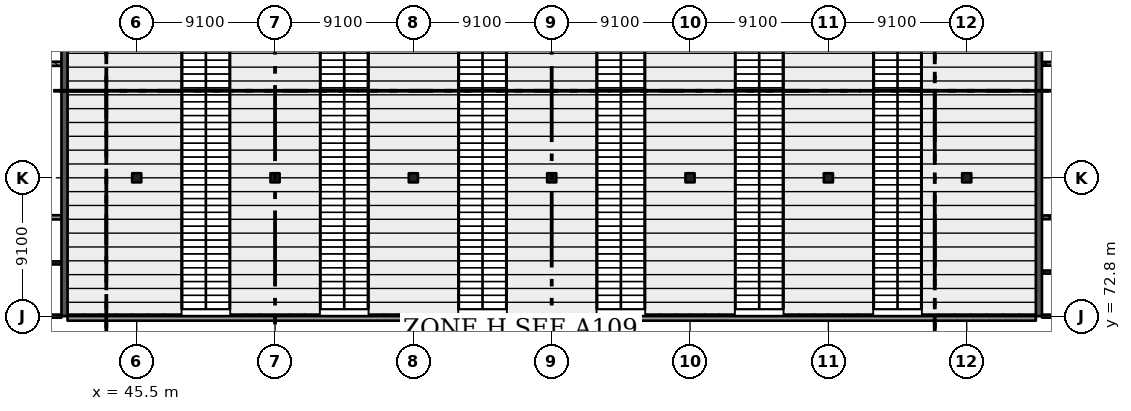
"""IFC4 building model, lengths in metres.
Left out: names, types, materials, properties, quantities, classifications, styles, units other than length and angle.
Written with IfcOpenShell. Run it as: python <this file> out.ifc"""

import sys

from ifc_helpers import new_model, si_unit, direction, frame, frame_2d, origin, origin_2d, place, context, subcontext, project, spatial, rectangle, extrude, element, save


model = new_model("IFC4")
c1 = context("Model", 3, precision=1e-05, world=origin(), true_north=direction((0.0, 1.0)))
c2 = subcontext(c1, "Body", "Model", "MODEL_VIEW")
j1 = project(units=[si_unit("LENGTHUNIT", "METRE"), si_unit("PLANEANGLEUNIT", "RADIAN")], contexts=[c1])
p1 = place(None, origin())
s1 = spatial("IfcSite", under=j1, at=p1, CompositionType="ELEMENT")
p2 = place(p1, origin())
s2 = spatial("IfcBuilding", under=s1, at=p2, CompositionType="ELEMENT")
p3 = place(p2, origin())
s3 = spatial("IfcBuildingStorey", under=s2, at=p3, CompositionType="ELEMENT", Elevation=0.0)
for number, where, z_axis, x_axis in (
    (1, (45.5, 81.9, -0.4), (0.0, 0.0, 1.0), (1.0, 0.0, 0.0)),
    (2, (54.6, 81.9, -0.4), (0.0, 0.0, 1.0), (1.0, 0.0, 0.0)),
    (3, (63.7, 81.9, -0.4), (0.0, 0.0, 1.0), (1.0, 0.0, 0.0)),
    (4, (72.8, 81.9, -0.4), (0.0, 0.0, 1.0), (1.0, 0.0, 0.0)),
    (5, (81.9, 81.9, -0.4), (0.0, 0.0, 1.0), (1.0, 0.0, 0.0)),
    (6, (91.0, 81.9, -0.4), (0.0, 0.0, 1.0), (1.0, 0.0, 0.0)),
    (7, (100.1, 81.9, -0.4), (0.0, 0.0, 1.0), (1.0, 0.0, 0.0)),
):
    element("IfcColumn", number, at=place(p3, frame(where, z_axis=z_axis, x_axis=x_axis)), inside=s3, PredefinedType="COLUMN", context=c2, shape_type="SweptSolid", body=[
        extrude(rectangle(XDim=0.6, YDim=0.6, at=origin_2d()), origin(), (0.0, 0.0, 1.0), 2.133),
    ])
p4 = place(p3, frame((40.95, 72.65, -0.4), z_axis=(0.0, 0.0, 1.0), x_axis=(1.0, 0.0, 0.0)))
e8 = element("IfcWall", 8, at=p4, inside=s3, PredefinedType="SOLIDWALL", context=c2, shape_type="SweptSolid", body=[
    extrude(rectangle(XDim=63.7, YDim=0.3, at=frame_2d((31.85, 0.0))), origin(), (0.0, 0.0, 1.0), 1.45),
])
for number, where, z_axis, x_axis in (
    (9, (40.75, 72.8, -0.4), (0.0, 0.0, 1.0), (0.0, 1.0, 0.0)),
    (10, (104.85, 72.8, -0.4), (0.0, 0.0, 1.0), (0.0, 1.0, 0.0)),
):
    element("IfcWall", number, at=place(p3, frame(where, z_axis=z_axis, x_axis=x_axis)), inside=s3, PredefinedType="SHEAR", context=c2, shape_type="SweptSolid", body=[
        extrude(rectangle(XDim=18.2, YDim=0.4, at=frame_2d((9.1, 0.0))), origin(), (0.0, 0.0, 1.0), 6.77),
    ])
p5 = place(p3, frame((0.2, 76.3, 0.0), z_axis=(0.0, 0.0, 1.0), x_axis=(1.0, 0.0, 0.0)))
e11 = element("IfcWall", 11, at=p5, inside=s3, PredefinedType="PARTITIONING", context=c2, shape_type="SweptSolid", body=[
    extrude(rectangle(XDim=40.35, YDim=0.2, at=frame_2d((20.175, 0.0))), origin(), (0.0, 0.0, 1.0), 6.02),
])
p6 = place(p5, frame((3.85, 0.0, 0.0)))
e12 = element("IfcOpeningElement", 12, at=p6, cuts=e11, PredefinedType="OPENING", context=c2, shape_type="SweptSolid", body=[
    extrude(rectangle(XDim=1.1, YDim=2.1, at=frame_2d((0.55, 1.05))), frame((0.0, 0.11, 0.0), z_axis=(0.0, -1.0, 0.0), x_axis=(1.0, 0.0, 0.0)), (0.0, 0.0, 1.0), 0.22),
])
p7 = place(p5, frame((21.95, 0.0, 0.0)))
e13 = element("IfcOpeningElement", 13, at=p7, cuts=e11, PredefinedType="OPENING", context=c2, shape_type="SweptSolid", body=[
    extrude(rectangle(XDim=1.1, YDim=2.1, at=frame_2d((0.55, 1.05))), frame((0.0, 0.11, 0.0), z_axis=(0.0, -1.0, 0.0), x_axis=(1.0, 0.0, 0.0)), (0.0, 0.0, 1.0), 0.22),
])
p8 = place(p5, frame((28.75, 0.0, 0.0)))
e14 = element("IfcOpeningElement", 14, at=p8, cuts=e11, PredefinedType="OPENING", context=c2, shape_type="SweptSolid", body=[
    extrude(rectangle(XDim=1.2, YDim=2.1, at=frame_2d((0.6, 1.05))), frame((0.0, 0.11, 0.0), z_axis=(0.0, -1.0, 0.0), x_axis=(1.0, 0.0, 0.0)), (0.0, 0.0, 1.0), 0.22),
])
p9 = place(p5, frame((33.5, 0.0, 0.0)))
e15 = element("IfcOpeningElement", 15, at=p9, cuts=e11, PredefinedType="OPENING", context=c2, shape_type="SweptSolid", body=[
    extrude(rectangle(XDim=0.9, YDim=2.0, at=frame_2d((0.45, 1.0))), frame((0.0, 0.11, 0.0), z_axis=(0.0, -1.0, 0.0), x_axis=(1.0, 0.0, 0.0)), (0.0, 0.0, 1.0), 0.22),
])
p10 = place(p5, frame((14.55, 0.0, 0.0)))
e16 = element("IfcOpeningElement", 16, at=p10, cuts=e11, PredefinedType="OPENING", context=c2, shape_type="SweptSolid", body=[
    extrude(rectangle(XDim=2.4, YDim=2.4, at=frame_2d((1.2, 1.2))), frame((0.0, 0.11, 0.0), z_axis=(0.0, -1.0, 0.0), x_axis=(1.0, 0.0, 0.0)), (0.0, 0.0, 1.0), 0.22),
])
p11 = place(p5, frame((9.95, 0.0, 0.0)))
e17 = element("IfcOpeningElement", 17, at=p11, cuts=e11, PredefinedType="OPENING", context=c2, shape_type="SweptSolid", body=[
    extrude(rectangle(XDim=2.4, YDim=2.4, at=frame_2d((1.2, 1.2))), frame((0.0, 0.11, 0.0), z_axis=(0.0, -1.0, 0.0), x_axis=(1.0, 0.0, 0.0)), (0.0, 0.0, 1.0), 0.22),
])
p12 = place(p5, frame((37.1, 0.0, 0.0)))
e18 = element("IfcOpeningElement", 18, at=p12, cuts=e11, PredefinedType="OPENING", context=c2, shape_type="SweptSolid", body=[
    extrude(rectangle(XDim=2.4, YDim=2.4, at=frame_2d((1.2, 1.2))), frame((0.0, 0.11, 0.0), z_axis=(0.0, -1.0, 0.0), x_axis=(1.0, 0.0, 0.0)), (0.0, 0.0, 1.0), 0.22),
])
p13 = place(p3, frame((40.55, 72.8, 0.0), z_axis=(0.0, 0.0, 1.0), x_axis=(-1.0, 0.0, 0.0)))
e19 = element("IfcWall", 19, at=p13, inside=s3, PredefinedType="PARTITIONING", context=c2, shape_type="SweptSolid", body=[
    extrude(rectangle(XDim=3.675, YDim=0.2, at=frame_2d((1.837, 0.0))), origin(), (0.0, 0.0, 1.0), 6.02),
])
p14 = place(p13, frame((0.65, 0.0, 0.0)))
e20 = element("IfcOpeningElement", 20, at=p14, cuts=e19, PredefinedType="OPENING", context=c2, shape_type="SweptSolid", body=[
    extrude(rectangle(XDim=2.4, YDim=2.4, at=frame_2d((1.2, 1.2))), frame((0.0, 0.11, 0.0), z_axis=(0.0, -1.0, 0.0), x_axis=(1.0, 0.0, 0.0)), (0.0, 0.0, 1.0), 0.22),
])
p15 = place(p3, frame((40.55, 79.3, 0.0), z_axis=(0.0, 0.0, 1.0), x_axis=(-1.0, 0.0, 0.0)))
e21 = element("IfcWall", 21, at=p15, inside=s3, PredefinedType="SOLIDWALL", context=c2, shape_type="SweptSolid", body=[
    extrude(rectangle(XDim=0.72, YDim=0.275, at=frame_2d((0.36, 0.0))), origin(), (0.0, 0.0, 1.0), 6.02),
])
p16 = place(p3, frame((40.55, 89.4, 0.0), z_axis=(0.0, 0.0, 1.0), x_axis=(-1.0, 0.0, 0.0)))
e22 = element("IfcWall", 22, at=p16, inside=s3, PredefinedType="SOLIDWALL", context=c2, shape_type="SweptSolid", body=[
    extrude(rectangle(XDim=3.588, YDim=0.275, at=frame_2d((1.794, 0.0))), origin(), (0.0, 0.0, 1.0), 6.02),
])
p17 = place(p16, frame((1.15, 0.0, 0.0)))
e23 = element("IfcOpeningElement", 23, at=p17, cuts=e22, PredefinedType="OPENING", context=c2, shape_type="SweptSolid", body=[
    extrude(rectangle(XDim=1.2, YDim=2.4, at=frame_2d((0.6, 1.2))), frame((0.0, 0.147, 0.0), z_axis=(0.0, -1.0, 0.0), x_axis=(1.0, 0.0, 0.0)), (0.0, 0.0, 1.0), 0.295),
])
p18 = place(p3, frame((105.77, 79.3, 0.0), z_axis=(0.0, 0.0, 1.0), x_axis=(-1.0, 0.0, 0.0)))
e24 = element("IfcWall", 24, at=p18, inside=s3, PredefinedType="SOLIDWALL", context=c2, shape_type="SweptSolid", body=[
    extrude(rectangle(XDim=0.72, YDim=0.25, at=frame_2d((0.36, 0.0))), origin(), (0.0, 0.0, 1.0), 6.02),
])
p19 = place(p3, frame((108.625, 89.4, 0.0), z_axis=(0.0, 0.0, 1.0), x_axis=(-1.0, 0.0, 0.0)))
e25 = element("IfcWall", 25, at=p19, inside=s3, PredefinedType="SOLIDWALL", context=c2, shape_type="SweptSolid", body=[
    extrude(rectangle(XDim=3.575, YDim=0.25, at=frame_2d((1.788, 0.0))), origin(), (0.0, 0.0, 1.0), 6.02),
])
p20 = place(p19, frame((1.35, 0.0, 0.0)))
e26 = element("IfcOpeningElement", 26, at=p20, cuts=e25, PredefinedType="OPENING", context=c2, shape_type="SweptSolid", body=[
    extrude(rectangle(XDim=0.8, YDim=2.1, at=frame_2d((0.4, 1.05))), frame((0.0, 0.135, 0.0), z_axis=(0.0, -1.0, 0.0), x_axis=(1.0, 0.0, 0.0)), (0.0, 0.0, 1.0), 0.27),
])
p21 = place(p3, frame((108.725, 72.8, 0.0), z_axis=(0.0, 0.0, 1.0), x_axis=(-1.0, 0.0, 0.0)))
e27 = element("IfcWall", 27, at=p21, inside=s3, PredefinedType="PARTITIONING", context=c2, shape_type="SweptSolid", body=[
    extrude(rectangle(XDim=3.675, YDim=0.2, at=frame_2d((1.837, 0.0))), origin(), (0.0, 0.0, 1.0), 6.02),
])
p22 = place(p21, frame((0.65, 0.0, 0.0)))
e28 = element("IfcOpeningElement", 28, at=p22, cuts=e27, PredefinedType="OPENING", context=c2, shape_type="SweptSolid", body=[
    extrude(rectangle(XDim=2.4, YDim=2.4, at=frame_2d((1.2, 1.2))), frame((0.0, 0.11, 0.0), z_axis=(0.0, -1.0, 0.0), x_axis=(1.0, 0.0, 0.0)), (0.0, 0.0, 1.0), 0.22),
])
p23 = place(p3, frame((105.05, 75.7, 0.0), z_axis=(0.0, 0.0, 1.0), x_axis=(1.0, 0.0, 0.0)))
e29 = element("IfcWall", 29, at=p23, inside=s3, PredefinedType="PARTITIONING", context=c2, shape_type="SweptSolid", body=[
    extrude(rectangle(XDim=40.35, YDim=0.2, at=frame_2d((20.175, 0.0))), origin(), (0.0, 0.0, 1.0), 6.02),
])
p24 = place(p23, frame((35.3, 0.0, 0.0)))
e30 = element("IfcOpeningElement", 30, at=p24, cuts=e29, PredefinedType="OPENING", context=c2, shape_type="SweptSolid", body=[
    extrude(rectangle(XDim=1.1, YDim=2.1, at=frame_2d((0.55, 1.05))), frame((0.0, 0.11, 0.0), z_axis=(0.0, -1.0, 0.0), x_axis=(1.0, 0.0, 0.0)), (0.0, 0.0, 1.0), 0.22),
])
p25 = place(p23, frame((17.3, 0.0, 0.0)))
e31 = element("IfcOpeningElement", 31, at=p25, cuts=e29, PredefinedType="OPENING", context=c2, shape_type="SweptSolid", body=[
    extrude(rectangle(XDim=1.1, YDim=2.1, at=frame_2d((0.55, 1.05))), frame((0.0, 0.11, 0.0), z_axis=(0.0, -1.0, 0.0), x_axis=(1.0, 0.0, 0.0)), (0.0, 0.0, 1.0), 0.22),
])
p26 = place(p23, frame((10.45, 0.0, 0.0)))
e32 = element("IfcOpeningElement", 32, at=p26, cuts=e29, PredefinedType="OPENING", context=c2, shape_type="SweptSolid", body=[
    extrude(rectangle(XDim=1.0, YDim=2.1, at=frame_2d((0.5, 1.05))), frame((0.0, 0.11, 0.0), z_axis=(0.0, -1.0, 0.0), x_axis=(1.0, 0.0, 0.0)), (0.0, 0.0, 1.0), 0.22),
])
p27 = place(p23, frame((5.9, 0.0, 0.0)))
e33 = element("IfcOpeningElement", 33, at=p27, cuts=e29, PredefinedType="OPENING", context=c2, shape_type="SweptSolid", body=[
    extrude(rectangle(XDim=1.0, YDim=2.1, at=frame_2d((0.5, 1.05))), frame((0.0, 0.11, 0.0), z_axis=(0.0, -1.0, 0.0), x_axis=(1.0, 0.0, 0.0)), (0.0, 0.0, 1.0), 0.22),
])
p28 = place(p23, frame((28.0, 0.0, 0.0)))
e34 = element("IfcOpeningElement", 34, at=p28, cuts=e29, PredefinedType="OPENING", context=c2, shape_type="SweptSolid", body=[
    extrude(rectangle(XDim=2.4, YDim=2.4, at=frame_2d((1.2, 1.2))), frame((0.0, 0.11, 0.0), z_axis=(0.0, -1.0, 0.0), x_axis=(1.0, 0.0, 0.0)), (0.0, 0.0, 1.0), 0.22),
])
p29 = place(p23, frame((23.4, 0.0, 0.0)))
e35 = element("IfcOpeningElement", 35, at=p29, cuts=e29, PredefinedType="OPENING", context=c2, shape_type="SweptSolid", body=[
    extrude(rectangle(XDim=2.4, YDim=2.4, at=frame_2d((1.2, 1.2))), frame((0.0, 0.11, 0.0), z_axis=(0.0, -1.0, 0.0), x_axis=(1.0, 0.0, 0.0)), (0.0, 0.0, 1.0), 0.22),
])
p30 = place(p23, frame((0.9, 0.0, 0.0)))
e36 = element("IfcOpeningElement", 36, at=p30, cuts=e29, PredefinedType="OPENING", context=c2, shape_type="SweptSolid", body=[
    extrude(rectangle(XDim=2.4, YDim=2.4, at=frame_2d((1.2, 1.2))), frame((0.0, 0.11, 0.0), z_axis=(0.0, -1.0, 0.0), x_axis=(1.0, 0.0, 0.0)), (0.0, 0.0, 1.0), 0.22),
])
save(model, sys.argv[1])
